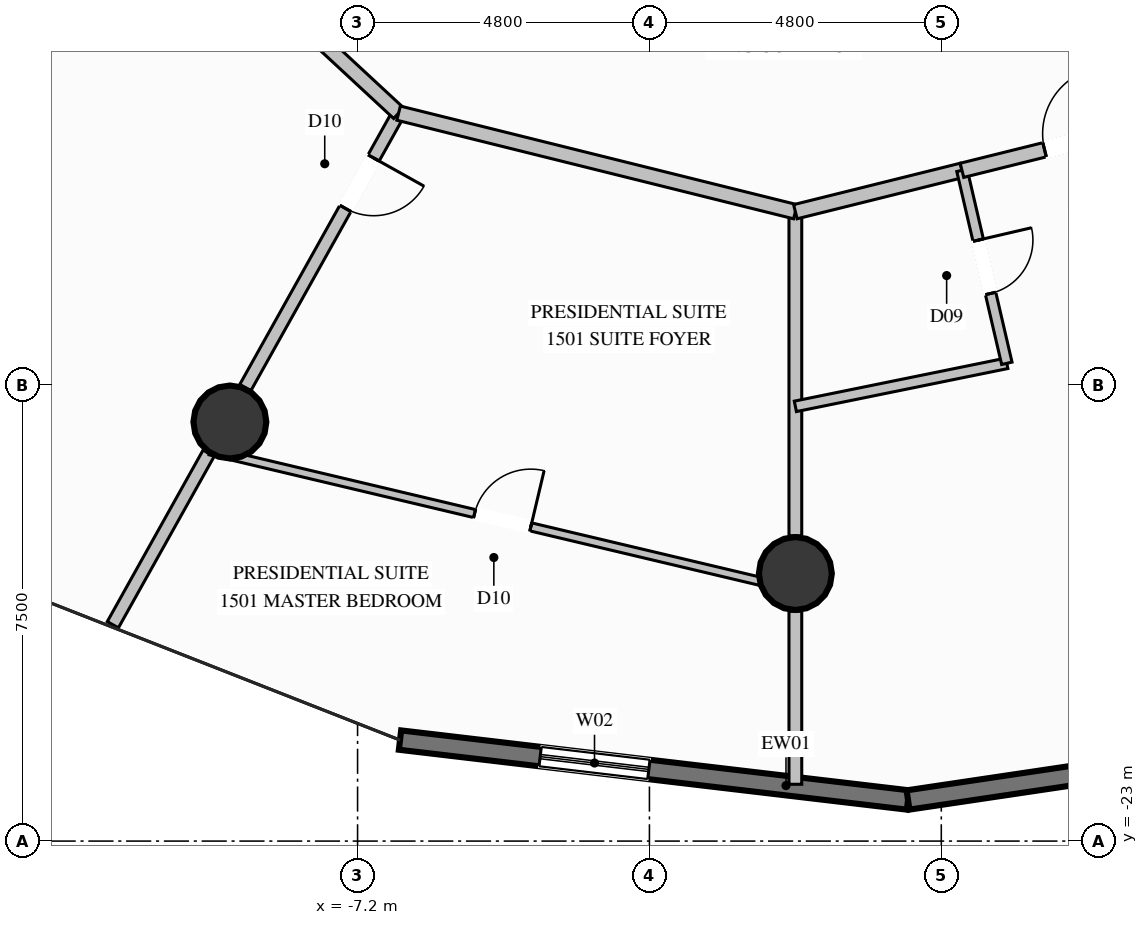
"""IFC4 building model, lengths in metres.
Left out: names, types, materials, properties, quantities, classifications, styles, units other than length and angle.
Written with IfcOpenShell. Run it as: python <this file> out.ifc"""

import sys

from ifc_helpers import new_model, si_unit, direction, frame, frame_2d, origin, origin_2d, place, context, subcontext, project, spatial, rectangle, circle, extrude, element, fill, save


model = new_model("IFC4")
c1 = context("Model", 3, precision=1e-05, world=origin(), true_north=direction((0.0, 1.0)))
c2 = subcontext(c1, "Body", "Model", "MODEL_VIEW")
j1 = project(units=[si_unit("LENGTHUNIT", "METRE"), si_unit("PLANEANGLEUNIT", "RADIAN")], contexts=[c1])
p1 = place(None, origin())
s1 = spatial("IfcSite", under=j1, at=p1, CompositionType="ELEMENT")
p2 = place(p1, origin())
s2 = spatial("IfcBuilding", under=s1, at=p2, CompositionType="ELEMENT")
p3 = place(p2, frame((0.0, 0.0, 57.2)))
s3 = spatial("IfcBuildingStorey", under=s2, at=p3, CompositionType="ELEMENT", Elevation=57.2)
for number, where, z_axis, x_axis in (
    (1, (-9.3, -16.108, 0.0), (0.0, 0.0, 1.0), (1.0, 0.0, 0.0)),
    (2, (0.0, -18.6, 0.0), (0.0, 0.0, 1.0), (1.0, 0.0, 0.0)),
):
    element("IfcColumn", number, at=place(p3, frame(where, z_axis=z_axis, x_axis=x_axis)), inside=s3, PredefinedType="COLUMN", context=c2, shape_type="SweptSolid", body=[
        extrude(circle(Radius=0.6, at=origin_2d()), origin(), (0.0, 0.0, 1.0), 3.6),
    ])
p4 = place(p3, frame((1.853, -22.324, 0.0), z_axis=(0.0, 0.0, 1.0), x_axis=(-0.993124034761, 0.117066867986, 0.0)))
e3 = element("IfcWall", 3, at=p4, inside=s3, PredefinedType="SOLIDWALL", context=c2, shape_type="SweptSolid", body=[
    extrude(rectangle(XDim=8.413, YDim=0.32, at=frame_2d((4.207, 0.0))), origin(), (0.0, 0.0, 1.0), 3.34),
])
p5 = place(p4, frame((4.292, 0.0, 0.35)))
e4 = element("IfcOpeningElement", 4, at=p5, cuts=e3, PredefinedType="OPENING", context=c2, shape_type="SweptSolid", body=[
    extrude(rectangle(XDim=1.8, YDim=2.6, at=frame_2d((0.9, 1.3))), frame((0.0, 0.17, 0.0), z_axis=(0.0, -1.0, 0.0), x_axis=(1.0, 0.0, 0.0)), (0.0, 0.0, 1.0), 0.34),
])
p6 = place(p3, frame((9.913, -21.125, 0.0), z_axis=(0.0, 0.0, 1.0), x_axis=(-0.989116261704, -0.147136062314, 0.0)))
e5 = element("IfcWall", 5, at=p6, inside=s3, PredefinedType="SOLIDWALL", context=c2, shape_type="SweptSolid", body=[
    extrude(rectangle(XDim=8.149, YDim=0.32, at=frame_2d((4.074, 0.0))), origin(), (0.0, 0.0, 1.0), 3.34),
])
p7 = place(p6, frame((3.174, 0.0, 0.35)))
e6 = element("IfcOpeningElement", 6, at=p7, cuts=e5, PredefinedType="OPENING", context=c2, shape_type="SweptSolid", body=[
    extrude(rectangle(XDim=1.8, YDim=2.6, at=frame_2d((0.9, 1.3))), frame((0.0, 0.17, 0.0), z_axis=(0.0, -1.0, 0.0), x_axis=(1.0, 0.0, 0.0)), (0.0, 0.0, 1.0), 0.34),
])
p8 = place(p3, frame((-6.525, -11.029, 0.0), z_axis=(0.0, 0.0, 1.0), x_axis=(-0.487682685555, -0.873020960922, 0.0)))
e7 = element("IfcWall", 7, at=p8, inside=s3, PredefinedType="PARTITIONING", context=c2, shape_type="SweptSolid", body=[
    extrude(rectangle(XDim=5.169, YDim=0.21, at=frame_2d((2.585, 0.0))), origin(), (0.0, 0.0, 1.0), 2.707),
])
p9 = place(p8, frame((0.844, 0.0, 0.0)))
e8 = element("IfcOpeningElement", 8, at=p9, cuts=e7, PredefinedType="OPENING", context=c2, shape_type="SweptSolid", body=[
    extrude(rectangle(XDim=0.95, YDim=2.1, at=frame_2d((0.475, 1.05))), frame((0.0, 0.115, 0.0), z_axis=(0.0, -1.0, 0.0), x_axis=(1.0, 0.0, 0.0)), (0.0, 0.0, 1.0), 0.23),
])
p10 = place(p3, frame((-9.649, -16.621, 0.0), z_axis=(0.0, 0.0, 1.0), x_axis=(-0.487784102601, -0.872964300101, 0.0)))
e9 = element("IfcWall", 9, at=p10, inside=s3, PredefinedType="PARTITIONING", context=c2, shape_type="SweptSolid", body=[
    extrude(rectangle(XDim=3.231, YDim=0.21, at=frame_2d((1.616, 0.0))), origin(), (0.0, 0.0, 1.0), 3.34),
])
p11 = place(p3, frame((0.0, -12.65, 0.0), z_axis=(0.0, 0.0, 1.0), x_axis=(0.0, -1.0, 0.0)))
e10 = element("IfcWall", 10, at=p11, inside=s3, PredefinedType="PARTITIONING", context=c2, shape_type="SweptSolid", body=[
    extrude(rectangle(XDim=5.33, YDim=0.21, at=frame_2d((2.665, 0.0))), origin(), (0.0, 0.0, 1.0), 2.707),
])
p12 = place(p3, frame((0.0, -19.22, 0.0), z_axis=(0.0, 0.0, 1.0), x_axis=(0.0, -1.0, 0.0)))
e11 = element("IfcWall", 11, at=p12, inside=s3, PredefinedType="PARTITIONING", context=c2, shape_type="SweptSolid", body=[
    extrude(rectangle(XDim=2.846, YDim=0.21, at=frame_2d((1.423, 0.0))), origin(), (0.0, 0.0, 1.0), 3.34),
])
p13 = place(p3, frame((-11.302, -6.6, 0.0), z_axis=(0.0, 0.0, 1.0), x_axis=(0.733323191675, -0.679880207501, 0.0)))
e12 = element("IfcWall", 12, at=p13, inside=s3, PredefinedType="PARTITIONING", context=c2, shape_type="SweptSolid", body=[
    extrude(rectangle(XDim=6.514, YDim=0.24, at=frame_2d((3.257, 0.0))), origin(), (0.0, 0.0, 1.0), 3.34),
])
p14 = place(p3, frame((-6.525, -11.029, 0.0), z_axis=(0.0, 0.0, 1.0), x_axis=(0.970504544001, -0.241082828243, 0.0)))
e13 = element("IfcWall", 13, at=p14, inside=s3, PredefinedType="PARTITIONING", context=c2, shape_type="SweptSolid", body=[
    extrude(rectangle(XDim=6.723, YDim=0.24, at=frame_2d((3.362, 0.0))), origin(), (0.0, 0.0, 1.0), 2.919),
])
p15 = place(p3, frame((-9.627, -16.582, 0.0), z_axis=(0.0, 0.0, 1.0), x_axis=(0.973014715796, -0.230743066733, 0.0)))
e14 = element("IfcWall", 14, at=p15, inside=s3, PredefinedType="PARTITIONING", context=c2, shape_type="SweptSolid", body=[
    extrude(rectangle(XDim=9.894, YDim=0.135, at=frame_2d((4.947, 0.0))), origin(), (0.0, 0.0, 1.0), 2.792),
])
p16 = place(p15, frame((4.472, 0.0, 0.0)))
e15 = element("IfcOpeningElement", 15, at=p16, cuts=e14, PredefinedType="OPENING", context=c2, shape_type="SweptSolid", body=[
    extrude(rectangle(XDim=0.95, YDim=2.1, at=frame_2d((0.475, 1.05))), frame((0.0, 0.078, 0.0), z_axis=(0.0, -1.0, 0.0), x_axis=(1.0, 0.0, 0.0)), (0.0, 0.0, 1.0), 0.155),
])
p17 = place(p3, frame((0.0, -12.65, 0.0), z_axis=(0.0, 0.0, 1.0), x_axis=(0.970482346271, 0.241172169986, 0.0)))
e16 = element("IfcWall", 16, at=p17, inside=s3, PredefinedType="PARTITIONING", context=c2, shape_type="SweptSolid", body=[
    extrude(rectangle(XDim=2.823, YDim=0.24, at=frame_2d((1.412, 0.0))), origin(), (0.0, 0.0, 1.0), 2.919),
])
p18 = place(p3, frame((0.0, -15.851, 0.0), z_axis=(0.0, 0.0, 1.0), x_axis=(0.979902948641, 0.199474838626, 0.0)))
e17 = element("IfcWall", 17, at=p18, inside=s3, PredefinedType="PLUMBINGWALL", context=c2, shape_type="SweptSolid", body=[
    extrude(rectangle(XDim=3.549, YDim=0.175, at=frame_2d((1.775, 0.0))), origin(), (0.0, 0.0, 1.0), 3.34),
])
p19 = place(p3, frame((2.74, -11.969, 0.0), z_axis=(0.0, 0.0, 1.0), x_axis=(0.226478783663, -0.974016098712, 0.0)))
e18 = element("IfcWall", 18, at=p19, inside=s3, PredefinedType="PLUMBINGWALL", context=c2, shape_type="SweptSolid", body=[
    extrude(rectangle(XDim=3.259, YDim=0.175, at=frame_2d((1.629, 0.0))), origin(), (0.0, 0.0, 1.0), 3.34),
])
p20 = place(p19, frame((1.179, 0.0, 0.0)))
e19 = element("IfcOpeningElement", 19, at=p20, cuts=e18, PredefinedType="OPENING", context=c2, shape_type="SweptSolid", body=[
    extrude(rectangle(XDim=0.9, YDim=2.1, at=frame_2d((0.45, 1.05))), frame((0.0, 0.098, 0.0), z_axis=(0.0, -1.0, 0.0), x_axis=(1.0, 0.0, 0.0)), (0.0, 0.0, 1.0), 0.195),
])
p21 = place(p3, frame((2.74, -11.969, 0.0), z_axis=(0.0, 0.0, 1.0), x_axis=(0.97052060898, 0.24101814775, 0.0)))
e20 = element("IfcWall", 20, at=p21, inside=s3, PredefinedType="PARTITIONING", context=c2, shape_type="SweptSolid", body=[
    extrude(rectangle(XDim=3.9, YDim=0.24, at=frame_2d((1.95, 0.0))), origin(), (0.0, 0.0, 1.0), 2.919),
])
p22 = place(p21, frame((1.4, 0.0, 0.0)))
e21 = element("IfcOpeningElement", 21, at=p22, cuts=e20, PredefinedType="OPENING", context=c2, shape_type="SweptSolid", body=[
    extrude(rectangle(XDim=1.1, YDim=2.3, at=frame_2d((0.55, 1.15))), frame((0.0, 0.13, 0.0), z_axis=(0.0, -1.0, 0.0), x_axis=(1.0, 0.0, 0.0)), (0.0, 0.0, 1.0), 0.26),
])
p23 = place(p5, origin())
e22 = element("IfcWindow", 22, at=p23, inside=s3, PartitioningType="SINGLE_PANEL", PredefinedType="WINDOW", context=c2, shape_type="SweptSolid", body=[
    extrude(rectangle(XDim=1.8, YDim=2.6, at=frame_2d((0.9, 1.3))), frame((0.0, 0.03, 0.0), z_axis=(0.0, -1.0, 0.0), x_axis=(1.0, 0.0, 0.0)), (0.0, 0.0, 1.0), 0.06),
])
fill(e4, e22)
p24 = place(p9, origin())
e23 = element("IfcDoor", 23, at=p24, inside=s3, OperationType="SINGLE_SWING_LEFT", PredefinedType="DOOR", context=c2, shape_type="SweptSolid", body=[
    extrude(rectangle(XDim=0.95, YDim=2.1, at=frame_2d((0.475, 1.05))), frame((0.0, 0.025, 0.0), z_axis=(0.0, -1.0, 0.0), x_axis=(1.0, 0.0, 0.0)), (0.0, 0.0, 1.0), 0.05),
])
fill(e8, e23)
p25 = place(p16, origin())
e24 = element("IfcDoor", 24, at=p25, inside=s3, OperationType="SINGLE_SWING_RIGHT", PredefinedType="DOOR", context=c2, shape_type="SweptSolid", body=[
    extrude(rectangle(XDim=0.95, YDim=2.1, at=frame_2d((0.475, 1.05))), frame((0.0, 0.025, 0.0), z_axis=(0.0, -1.0, 0.0), x_axis=(1.0, 0.0, 0.0)), (0.0, 0.0, 1.0), 0.05),
])
fill(e15, e24)
p26 = place(p20, origin())
e25 = element("IfcDoor", 25, at=p26, inside=s3, OperationType="SINGLE_SWING_LEFT", PredefinedType="DOOR", context=c2, shape_type="SweptSolid", body=[
    extrude(rectangle(XDim=0.9, YDim=2.1, at=frame_2d((0.45, 1.05))), frame((0.0, 0.025, 0.0), z_axis=(0.0, -1.0, 0.0), x_axis=(1.0, 0.0, 0.0)), (0.0, 0.0, 1.0), 0.05),
])
fill(e19, e25)
p27 = place(p22, origin())
e26 = element("IfcDoor", 26, at=p27, inside=s3, OperationType="SINGLE_SWING_RIGHT", PredefinedType="DOOR", context=c2, shape_type="SweptSolid", body=[
    extrude(rectangle(XDim=1.1, YDim=2.3, at=frame_2d((0.55, 1.15))), frame((0.0, 0.025, 0.0), z_axis=(0.0, -1.0, 0.0), x_axis=(1.0, 0.0, 0.0)), (0.0, 0.0, 1.0), 0.05),
])
fill(e21, e26)
save(model, sys.argv[1])
